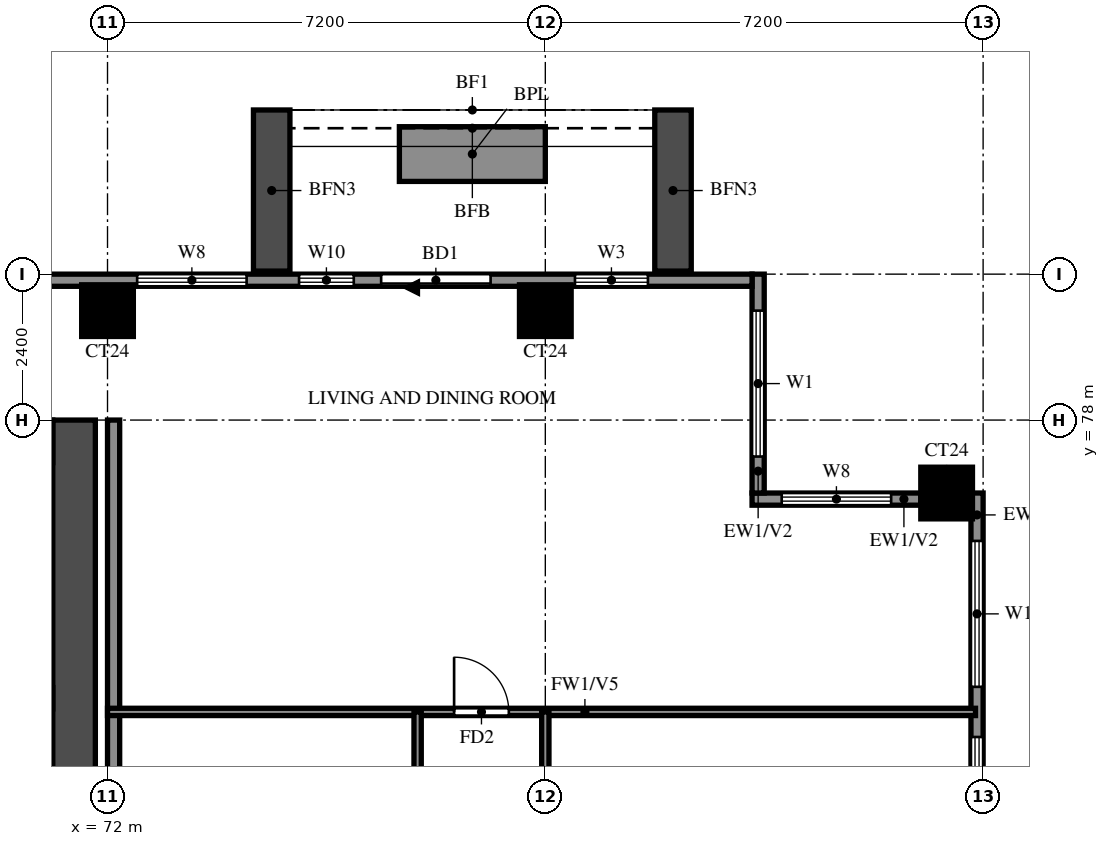
"""IFC4 building model, lengths in metres.
Left out: names, types, materials, properties, quantities, classifications, styles, units other than length and angle.
Written with IfcOpenShell. Run it as: python <this file> out.ifc"""

import sys

from ifc_helpers import new_model, si_unit, direction, frame, frame_2d, origin, origin_2d, place, context, subcontext, project, spatial, rectangle, extrude, source, transform, mapped, element, fill, save


model = new_model("IFC4")
c1 = context("Model", 3, precision=1e-05, world=origin(), true_north=direction((0.0, 1.0)))
c2 = subcontext(c1, "Body", "Model", "MODEL_VIEW")
j1 = project(units=[si_unit("LENGTHUNIT", "METRE"), si_unit("PLANEANGLEUNIT", "RADIAN")], contexts=[c1])
p1 = place(None, origin())
s1 = spatial("IfcSite", under=j1, at=p1, CompositionType="ELEMENT")
p2 = place(p1, origin())
s2 = spatial("IfcBuilding", under=s1, at=p2, CompositionType="ELEMENT")
p3 = place(p2, frame((0.0, 0.0, 157.0)))
s3 = spatial("IfcBuildingStorey", under=s2, at=p3, CompositionType="ELEMENT", Elevation=157.0)
m1 = source(origin(), c2, "Body", "SweptSolid", [
    extrude(rectangle(XDim=0.85, YDim=0.85, at=origin_2d()), origin(), (0.0, 0.0, 1.0), 3.2),
])
for number, where, z_axis, x_axis in (
    (1, (85.8, 76.8, 0.0), (0.0, 0.0, 1.0), (1.0, 0.0, 0.0)),
    (2, (72.0, 79.8, 0.0), (0.0, 0.0, 1.0), (1.0, 0.0, 0.0)),
    (3, (79.2, 79.8, 0.0), (0.0, 0.0, 1.0), (1.0, 0.0, 0.0)),
):
    element("IfcColumn", number, at=place(p3, frame(where, z_axis=z_axis, x_axis=x_axis)), inside=s3, PredefinedType="COLUMN", context=c2, shape_type="MappedRepresentation", body=[
        mapped(m1, transform((0.0, 0.0, 0.0))),
    ])
p4 = place(p3, frame((71.45, 66.1, 0.0), z_axis=(0.0, 0.0, 1.0), x_axis=(0.0, 1.0, 0.0)))
e4 = element("IfcWall", 4, at=p4, inside=s3, PredefinedType="SHEAR", context=c2, shape_type="SweptSolid", body=[
    extrude(rectangle(XDim=11.9, YDim=0.7, at=frame_2d((5.95, 0.0))), origin(), (0.0, 0.0, 1.0), 3.2),
])
p5 = place(p3, frame((29.7, 77.65, 0.0), z_axis=(0.0, 0.0, 1.0), x_axis=(1.0, 0.0, 0.0)))
e5 = element("IfcWall", 5, at=p5, inside=s3, PredefinedType="SHEAR", context=c2, shape_type="SweptSolid", body=[
    extrude(rectangle(XDim=41.4, YDim=0.7, at=frame_2d((20.7, 0.0))), origin(), (0.0, 0.0, 1.0), 3.2),
])
p6 = place(p3, frame((86.3, 69.6, 0.0), z_axis=(0.0, 0.0, 1.0), x_axis=(0.0, 1.0, 0.0)))
e6 = element("IfcWall", 6, at=p6, inside=s3, PredefinedType="SOLIDWALL", context=c2, shape_type="SweptSolid", body=[
    extrude(rectangle(XDim=7.2, YDim=0.2, at=frame_2d((3.6, 0.0))), origin(), (0.0, 0.0, 1.0), 3.2),
])
p7 = place(p6, frame((0.788, 0.0, 0.6)))
e7 = element("IfcOpeningElement", 7, at=p7, cuts=e6, PredefinedType="OPENING", context=c2, shape_type="SweptSolid", body=[
    extrude(rectangle(XDim=2.4, YDim=2.4, at=frame_2d((1.2, 1.2))), frame((0.0, 0.11, 0.0), z_axis=(0.0, -1.0, 0.0), x_axis=(1.0, 0.0, 0.0)), (0.0, 0.0, 1.0), 0.22),
])
p8 = place(p6, frame((4.012, 0.0, 0.6)))
e8 = element("IfcOpeningElement", 8, at=p8, cuts=e6, PredefinedType="OPENING", context=c2, shape_type="SweptSolid", body=[
    extrude(rectangle(XDim=2.4, YDim=2.4, at=frame_2d((1.2, 1.2))), frame((0.0, 0.11, 0.0), z_axis=(0.0, -1.0, 0.0), x_axis=(1.0, 0.0, 0.0)), (0.0, 0.0, 1.0), 0.22),
])
p9 = place(p3, frame((85.375, 76.7, 0.0), z_axis=(0.0, 0.0, 1.0), x_axis=(-1.0, 0.0, 0.0)))
e9 = element("IfcWall", 9, at=p9, inside=s3, PredefinedType="SOLIDWALL", context=c2, shape_type="SweptSolid", body=[
    extrude(rectangle(XDim=2.775, YDim=0.2, at=frame_2d((1.387, 0.0))), origin(), (0.0, 0.0, 1.0), 3.2),
])
p10 = place(p9, frame((0.488, 0.0, 0.6)))
e10 = element("IfcOpeningElement", 10, at=p10, cuts=e9, PredefinedType="OPENING", context=c2, shape_type="SweptSolid", body=[
    extrude(rectangle(XDim=1.8, YDim=2.4, at=frame_2d((0.9, 1.2))), frame((0.0, 0.11, 0.0), z_axis=(0.0, -1.0, 0.0), x_axis=(1.0, 0.0, 0.0)), (0.0, 0.0, 1.0), 0.22),
])
p11 = place(p3, frame((82.7, 76.8, 0.0), z_axis=(0.0, 0.0, 1.0), x_axis=(0.0, 1.0, 0.0)))
e11 = element("IfcWall", 11, at=p11, inside=s3, PredefinedType="SOLIDWALL", context=c2, shape_type="SweptSolid", body=[
    extrude(rectangle(XDim=3.6, YDim=0.2, at=frame_2d((1.8, 0.0))), origin(), (0.0, 0.0, 1.0), 3.2),
])
p12 = place(p11, frame((0.6, 0.0, 0.6)))
e12 = element("IfcOpeningElement", 12, at=p12, cuts=e11, PredefinedType="OPENING", context=c2, shape_type="SweptSolid", body=[
    extrude(rectangle(XDim=2.4, YDim=2.4, at=frame_2d((1.2, 1.2))), frame((0.0, 0.11, 0.0), z_axis=(0.0, -1.0, 0.0), x_axis=(1.0, 0.0, 0.0)), (0.0, 0.0, 1.0), 0.22),
])
p13 = place(p3, frame((82.6, 80.3, 0.0), z_axis=(0.0, 0.0, 1.0), x_axis=(-1.0, 0.0, 0.0)))
e13 = element("IfcWall", 13, at=p13, inside=s3, PredefinedType="SOLIDWALL", context=c2, shape_type="SweptSolid", body=[
    extrude(rectangle(XDim=64.6, YDim=0.2, at=frame_2d((32.3, 0.0))), origin(), (0.0, 0.0, 1.0), 3.2),
])
p14 = place(p13, frame((4.3, 0.0, 0.0)))
e14 = element("IfcOpeningElement", 14, at=p14, cuts=e13, PredefinedType="OPENING", context=c2, shape_type="SweptSolid", body=[
    extrude(rectangle(XDim=1.8, YDim=2.4, at=frame_2d((0.9, 1.2))), frame((0.0, 0.11, 0.0), z_axis=(0.0, -1.0, 0.0), x_axis=(1.0, 0.0, 0.0)), (0.0, 0.0, 1.0), 0.22),
])
p15 = place(p13, frame((54.758, 0.0, 0.6)))
e15 = element("IfcOpeningElement", 15, at=p15, cuts=e13, PredefinedType="OPENING", context=c2, shape_type="SweptSolid", body=[
    extrude(rectangle(XDim=2.4, YDim=2.4, at=frame_2d((1.2, 1.2))), frame((0.0, 0.11, 0.0), z_axis=(0.0, -1.0, 0.0), x_axis=(1.0, 0.0, 0.0)), (0.0, 0.0, 1.0), 0.22),
])
p16 = place(p13, frame((57.642, 0.0, 0.6)))
e16 = element("IfcOpeningElement", 16, at=p16, cuts=e13, PredefinedType="OPENING", context=c2, shape_type="SweptSolid", body=[
    extrude(rectangle(XDim=2.4, YDim=2.4, at=frame_2d((1.2, 1.2))), frame((0.0, 0.11, 0.0), z_axis=(0.0, -1.0, 0.0), x_axis=(1.0, 0.0, 0.0)), (0.0, 0.0, 1.0), 0.22),
])
p17 = place(p13, frame((61.988, 0.0, 0.6)))
e17 = element("IfcOpeningElement", 17, at=p17, cuts=e13, PredefinedType="OPENING", context=c2, shape_type="SweptSolid", body=[
    extrude(rectangle(XDim=1.8, YDim=2.4, at=frame_2d((0.9, 1.2))), frame((0.0, 0.11, 0.0), z_axis=(0.0, -1.0, 0.0), x_axis=(1.0, 0.0, 0.0)), (0.0, 0.0, 1.0), 0.22),
])
p18 = place(p13, frame((1.712, 0.0, 0.6)))
e18 = element("IfcOpeningElement", 18, at=p18, cuts=e13, PredefinedType="OPENING", context=c2, shape_type="SweptSolid", body=[
    extrude(rectangle(XDim=1.2, YDim=2.4, at=frame_2d((0.6, 1.2))), frame((0.0, 0.11, 0.0), z_axis=(0.0, -1.0, 0.0), x_axis=(1.0, 0.0, 0.0)), (0.0, 0.0, 1.0), 0.22),
])
p19 = place(p13, frame((6.55, 0.0, 0.6)))
e19 = element("IfcOpeningElement", 19, at=p19, cuts=e13, PredefinedType="OPENING", context=c2, shape_type="SweptSolid", body=[
    extrude(rectangle(XDim=0.9, YDim=2.4, at=frame_2d((0.45, 1.2))), frame((0.0, 0.11, 0.0), z_axis=(0.0, -1.0, 0.0), x_axis=(1.0, 0.0, 0.0)), (0.0, 0.0, 1.0), 0.22),
])
p20 = place(p13, frame((8.312, 0.0, 0.6)))
e20 = element("IfcOpeningElement", 20, at=p20, cuts=e13, PredefinedType="OPENING", context=c2, shape_type="SweptSolid", body=[
    extrude(rectangle(XDim=1.8, YDim=2.4, at=frame_2d((0.9, 1.2))), frame((0.0, 0.11, 0.0), z_axis=(0.0, -1.0, 0.0), x_axis=(1.0, 0.0, 0.0)), (0.0, 0.0, 1.0), 0.22),
])
for number, where, z_axis, x_axis in (
    (21, (81.3, 80.45, 0.0), (0.0, 0.0, 1.0), (0.0, 1.0, 0.0)),
    (22, (74.7, 80.45, 0.0), (0.0, 0.0, 1.0), (0.0, 1.0, 0.0)),
):
    element("IfcWall", number, at=place(p3, frame(where, z_axis=z_axis, x_axis=x_axis)), inside=s3, PredefinedType="SOLIDWALL", context=c2, shape_type="SweptSolid", body=[
        extrude(rectangle(XDim=2.65, YDim=0.6, at=frame_2d((1.325, 0.0))), origin(), (0.0, 0.0, 1.0), 2.85),
    ])
p21 = place(p3, frame((79.2, 82.375, 0.0), z_axis=(0.0, 0.0, 1.0), x_axis=(-1.0, 0.0, 0.0)))
e23 = element("IfcWall", 23, at=p21, inside=s3, PredefinedType="SOLIDWALL", context=c2, shape_type="SweptSolid", body=[
    extrude(rectangle(XDim=2.4, YDim=0.9, at=frame_2d((1.2, 0.0))), origin(), (0.0, 0.0, 1.0), 0.9),
])
p22 = place(p3, frame((72.1, 62.4, 0.0), z_axis=(0.0, 0.0, 1.0), x_axis=(0.0, 1.0, 0.0)))
e24 = element("IfcWall", 24, at=p22, inside=s3, PredefinedType="SOLIDWALL", context=c2, shape_type="SweptSolid", body=[
    extrude(rectangle(XDim=15.6, YDim=0.2, at=frame_2d((7.8, 0.0))), origin(), (0.0, 0.0, 1.0), 3.2),
])
p23 = place(p3, frame((72.0, 73.2, 0.0), z_axis=(0.0, 0.0, 1.0), x_axis=(1.0, 0.0, 0.0)))
e25 = element("IfcWall", 25, at=p23, inside=s3, PredefinedType="PARTITIONING", context=c2, shape_type="SweptSolid", body=[
    extrude(rectangle(XDim=14.275, YDim=0.12, at=frame_2d((7.137, 0.0))), origin(), (0.0, 0.0, 1.0), 2.3),
])
p24 = place(p23, frame((5.7, 0.0, 0.0)))
e26 = element("IfcOpeningElement", 26, at=p24, cuts=e25, PredefinedType="OPENING", context=c2, shape_type="SweptSolid", body=[
    extrude(rectangle(XDim=0.9, YDim=2.1, at=frame_2d((0.45, 1.05))), frame((0.0, 0.07, 0.0), z_axis=(0.0, -1.0, 0.0), x_axis=(1.0, 0.0, 0.0)), (0.0, 0.0, 1.0), 0.14),
])
p25 = place(p3, frame((77.1, 64.8, 0.0), z_axis=(0.0, 0.0, 1.0), x_axis=(0.0, 1.0, 0.0)))
e27 = element("IfcWall", 27, at=p25, inside=s3, PredefinedType="PARTITIONING", context=c2, shape_type="SweptSolid", body=[
    extrude(rectangle(XDim=8.4, YDim=0.12, at=frame_2d((4.2, 0.0))), origin(), (0.0, 0.0, 1.0), 3.2),
])
p26 = place(p25, frame((6.125, 0.0, 0.0)))
e28 = element("IfcOpeningElement", 28, at=p26, cuts=e27, PredefinedType="OPENING", context=c2, shape_type="SweptSolid", body=[
    extrude(rectangle(XDim=0.8, YDim=2.1, at=frame_2d((0.4, 1.05))), frame((0.0, 0.07, 0.0), z_axis=(0.0, -1.0, 0.0), x_axis=(1.0, 0.0, 0.0)), (0.0, 0.0, 1.0), 0.14),
])
p27 = place(p3, frame((79.2, 48.125, 0.0), z_axis=(0.0, 0.0, 1.0), x_axis=(0.0, 1.0, 0.0)))
e29 = element("IfcWall", 29, at=p27, inside=s3, PredefinedType="PARTITIONING", context=c2, shape_type="SweptSolid", body=[
    extrude(rectangle(XDim=25.075, YDim=0.12, at=frame_2d((12.538, 0.0))), origin(), (0.0, 0.0, 1.0), 3.2),
])
p28 = place(p27, frame((1.288, 0.0, 0.0)))
e30 = element("IfcOpeningElement", 30, at=p28, cuts=e29, PredefinedType="OPENING", context=c2, shape_type="SweptSolid", body=[
    extrude(rectangle(XDim=0.9, YDim=2.1, at=frame_2d((0.45, 1.05))), frame((0.0, 0.07, 0.0), z_axis=(0.0, -1.0, 0.0), x_axis=(1.0, 0.0, 0.0)), (0.0, 0.0, 1.0), 0.14),
])
p29 = place(p27, frame((4.825, 0.0, 0.0)))
e31 = element("IfcOpeningElement", 31, at=p29, cuts=e29, PredefinedType="OPENING", context=c2, shape_type="SweptSolid", body=[
    extrude(rectangle(XDim=0.9, YDim=2.1, at=frame_2d((0.45, 1.05))), frame((0.0, 0.07, 0.0), z_axis=(0.0, -1.0, 0.0), x_axis=(1.0, 0.0, 0.0)), (0.0, 0.0, 1.0), 0.14),
])
p30 = place(p27, frame((9.925, 0.0, 0.0)))
e32 = element("IfcOpeningElement", 32, at=p30, cuts=e29, PredefinedType="OPENING", context=c2, shape_type="SweptSolid", body=[
    extrude(rectangle(XDim=1.5, YDim=2.1, at=frame_2d((0.75, 1.05))), frame((0.0, 0.07, 0.0), z_axis=(0.0, -1.0, 0.0), x_axis=(1.0, 0.0, 0.0)), (0.0, 0.0, 1.0), 0.14),
])
p31 = place(p27, frame((15.625, 0.0, 0.0)))
e33 = element("IfcOpeningElement", 33, at=p31, cuts=e29, PredefinedType="OPENING", context=c2, shape_type="SweptSolid", body=[
    extrude(rectangle(XDim=0.9, YDim=2.1, at=frame_2d((0.45, 1.05))), frame((0.0, 0.07, 0.0), z_axis=(0.0, -1.0, 0.0), x_axis=(1.0, 0.0, 0.0)), (0.0, 0.0, 1.0), 0.14),
])
p32 = place(p27, frame((19.225, 0.0, 0.0)))
e34 = element("IfcOpeningElement", 34, at=p32, cuts=e29, PredefinedType="OPENING", context=c2, shape_type="SweptSolid", body=[
    extrude(rectangle(XDim=0.9, YDim=2.1, at=frame_2d((0.45, 1.05))), frame((0.0, 0.07, 0.0), z_axis=(0.0, -1.0, 0.0), x_axis=(1.0, 0.0, 0.0)), (0.0, 0.0, 1.0), 0.14),
])
p33 = place(p27, frame((22.825, 0.0, 0.0)))
e35 = element("IfcOpeningElement", 35, at=p33, cuts=e29, PredefinedType="OPENING", context=c2, shape_type="SweptSolid", body=[
    extrude(rectangle(XDim=0.9, YDim=2.1, at=frame_2d((0.45, 1.05))), frame((0.0, 0.07, 0.0), z_axis=(0.0, -1.0, 0.0), x_axis=(1.0, 0.0, 0.0)), (0.0, 0.0, 1.0), 0.14),
])
p34 = place(p7, origin())
e36 = element("IfcWindow", 36, at=p34, inside=s3, PartitioningType="DOUBLE_PANEL_VERTICAL", PredefinedType="WINDOW", context=c2, shape_type="SweptSolid", body=[
    extrude(rectangle(XDim=2.4, YDim=2.4, at=frame_2d((1.2, 1.2))), frame((0.0, 0.03, 0.0), z_axis=(0.0, -1.0, 0.0), x_axis=(1.0, 0.0, 0.0)), (0.0, 0.0, 1.0), 0.06),
])
fill(e7, e36)
p35 = place(p8, origin())
e37 = element("IfcWindow", 37, at=p35, inside=s3, PartitioningType="DOUBLE_PANEL_VERTICAL", PredefinedType="WINDOW", context=c2, shape_type="SweptSolid", body=[
    extrude(rectangle(XDim=2.4, YDim=2.4, at=frame_2d((1.2, 1.2))), frame((0.0, 0.03, 0.0), z_axis=(0.0, -1.0, 0.0), x_axis=(1.0, 0.0, 0.0)), (0.0, 0.0, 1.0), 0.06),
])
fill(e8, e37)
p36 = place(p10, origin())
e38 = element("IfcWindow", 38, at=p36, inside=s3, PartitioningType="DOUBLE_PANEL_VERTICAL", PredefinedType="WINDOW", context=c2, shape_type="SweptSolid", body=[
    extrude(rectangle(XDim=1.8, YDim=2.4, at=frame_2d((0.9, 1.2))), frame((0.0, 0.03, 0.0), z_axis=(0.0, -1.0, 0.0), x_axis=(1.0, 0.0, 0.0)), (0.0, 0.0, 1.0), 0.06),
])
fill(e10, e38)
p37 = place(p12, origin())
e39 = element("IfcWindow", 39, at=p37, inside=s3, PartitioningType="DOUBLE_PANEL_VERTICAL", PredefinedType="WINDOW", context=c2, shape_type="SweptSolid", body=[
    extrude(rectangle(XDim=2.4, YDim=2.4, at=frame_2d((1.2, 1.2))), frame((0.0, 0.03, 0.0), z_axis=(0.0, -1.0, 0.0), x_axis=(1.0, 0.0, 0.0)), (0.0, 0.0, 1.0), 0.06),
])
fill(e12, e39)
p38 = place(p14, origin())
e40 = element("IfcDoor", 40, at=p38, inside=s3, OperationType="DOUBLE_DOOR_SLIDING", PredefinedType="DOOR", context=c2, shape_type="SweptSolid", body=[
    extrude(rectangle(XDim=1.8, YDim=2.4, at=frame_2d((0.9, 1.2))), frame((0.0, 0.025, 0.0), z_axis=(0.0, -1.0, 0.0), x_axis=(1.0, 0.0, 0.0)), (0.0, 0.0, 1.0), 0.05),
])
fill(e14, e40)
p39 = place(p18, origin())
e41 = element("IfcWindow", 41, at=p39, inside=s3, PartitioningType="SINGLE_PANEL", PredefinedType="WINDOW", context=c2, shape_type="SweptSolid", body=[
    extrude(rectangle(XDim=1.2, YDim=2.4, at=frame_2d((0.6, 1.2))), frame((0.0, 0.03, 0.0), z_axis=(0.0, -1.0, 0.0), x_axis=(1.0, 0.0, 0.0)), (0.0, 0.0, 1.0), 0.06),
])
fill(e18, e41)
p40 = place(p19, origin())
e42 = element("IfcWindow", 42, at=p40, inside=s3, PartitioningType="SINGLE_PANEL", PredefinedType="WINDOW", context=c2, shape_type="SweptSolid", body=[
    extrude(rectangle(XDim=0.9, YDim=2.4, at=frame_2d((0.45, 1.2))), frame((0.0, 0.03, 0.0), z_axis=(0.0, -1.0, 0.0), x_axis=(1.0, 0.0, 0.0)), (0.0, 0.0, 1.0), 0.06),
])
fill(e19, e42)
p41 = place(p20, origin())
e43 = element("IfcWindow", 43, at=p41, inside=s3, PartitioningType="DOUBLE_PANEL_VERTICAL", PredefinedType="WINDOW", context=c2, shape_type="SweptSolid", body=[
    extrude(rectangle(XDim=1.8, YDim=2.4, at=frame_2d((0.9, 1.2))), frame((0.0, 0.03, 0.0), z_axis=(0.0, -1.0, 0.0), x_axis=(1.0, 0.0, 0.0)), (0.0, 0.0, 1.0), 0.06),
])
fill(e20, e43)
p42 = place(p24, origin())
e44 = element("IfcDoor", 44, at=p42, inside=s3, OperationType="SINGLE_SWING_LEFT", PredefinedType="DOOR", context=c2, shape_type="SweptSolid", body=[
    extrude(rectangle(XDim=0.9, YDim=2.1, at=frame_2d((0.45, 1.05))), frame((0.0, 0.025, 0.0), z_axis=(0.0, -1.0, 0.0), x_axis=(1.0, 0.0, 0.0)), (0.0, 0.0, 1.0), 0.05),
])
fill(e26, e44)
save(model, sys.argv[1])
